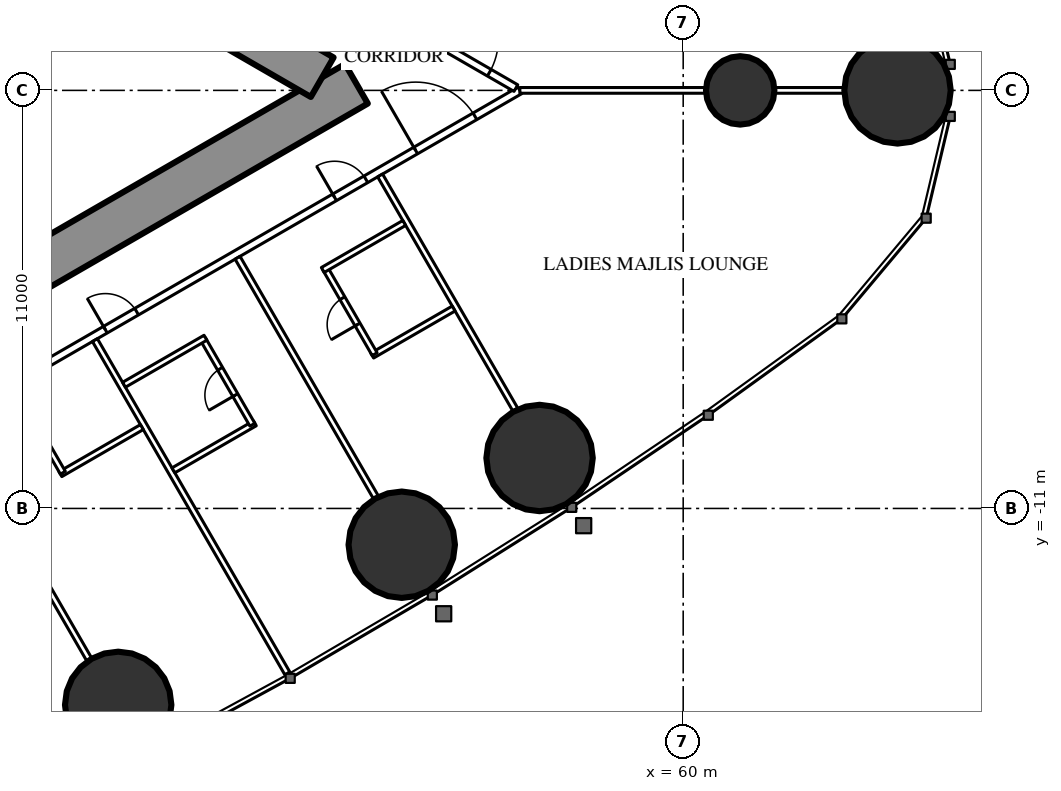
"""IFC4 building model, lengths in metres.
Left out: names, types, materials, properties, quantities, classifications, styles, units other than length and angle.
Written with IfcOpenShell. Run it as: python <this file> out.ifc"""

import sys

from ifc_helpers import new_model, si_unit, direction, frame, frame_2d, origin, origin_2d, place, context, subcontext, project, spatial, rectangle, circle, extrude, element, fill, save


model = new_model("IFC4")
c1 = context("Model", 3, precision=1e-05, world=origin(), true_north=direction((0.0, 1.0)))
c2 = subcontext(c1, "Body", "Model", "MODEL_VIEW")
j1 = project(units=[si_unit("LENGTHUNIT", "METRE"), si_unit("PLANEANGLEUNIT", "RADIAN")], contexts=[c1])
p1 = place(None, origin())
s1 = spatial("IfcSite", under=j1, at=p1, CompositionType="ELEMENT")
p2 = place(p1, origin())
s2 = spatial("IfcBuilding", under=s1, at=p2, CompositionType="ELEMENT")
p3 = place(p2, frame((0.0, 0.0, 194.8)))
s3 = spatial("IfcBuildingStorey", under=s2, at=p3, CompositionType="ELEMENT", Elevation=194.8)
for number, where, z_axis, x_axis in (
    (1, (65.64, 0.0, 0.0), (0.0, 0.0, 1.0), (1.0, 0.0, 0.0)),
    (2, (45.134, -16.168, 0.0), (0.0, 0.0, 1.0), (1.0, 0.0, 0.0)),
    (3, (52.594, -11.955, 0.0), (0.0, 0.0, 1.0), (1.0, 0.0, 0.0)),
    (4, (56.221, -9.672, 0.0), (0.0, 0.0, 1.0), (1.0, 0.0, 0.0)),
):
    element("IfcColumn", number, at=place(p3, frame(where, z_axis=z_axis, x_axis=x_axis)), inside=s3, PredefinedType="COLUMN", context=c2, shape_type="SweptSolid", body=[
        extrude(circle(Radius=1.4, at=origin_2d()), origin(), (0.0, 0.0, 1.0), 3.5),
    ])
p4 = place(p3, frame((61.5, 0.0, 0.0), z_axis=(0.0, 0.0, 1.0), x_axis=(1.0, 0.0, 0.0)))
e5 = element("IfcColumn", 5, at=p4, inside=s3, PredefinedType="COLUMN", context=c2, shape_type="SweptSolid", body=[
    extrude(circle(Radius=0.9, at=origin_2d()), origin(), (0.0, 0.0, 1.0), 3.5),
])
p5 = place(p3, frame((27.2, -13.8, 0.0), z_axis=(0.0, 0.0, 1.0), x_axis=(0.866027159892, 0.499996958321, 0.0)))
e6 = element("IfcWall", 6, at=p5, inside=s3, PredefinedType="SHEAR", context=c2, shape_type="SweptSolid", body=[
    extrude(rectangle(XDim=27.947, YDim=1.2, at=frame_2d((13.973, 0.0))), origin(), (0.0, 0.0, 1.0), 3.5),
])
p6 = place(p5, frame((4.6, 0.0, 0.0)))
e7 = element("IfcOpeningElement", 7, at=p6, cuts=e6, PredefinedType="OPENING", context=c2, shape_type="SweptSolid", body=[
    extrude(rectangle(XDim=1.0, YDim=2.2, at=frame_2d((0.5, 1.1))), frame((0.0, 0.61, 0.0), z_axis=(0.0, -1.0, 0.0), x_axis=(1.0, 0.0, 0.0)), (0.0, 0.0, 1.0), 1.22),
])
p7 = place(p5, frame((13.395, 0.0, 0.0)))
e8 = element("IfcOpeningElement", 8, at=p7, cuts=e6, PredefinedType="OPENING", context=c2, shape_type="SweptSolid", body=[
    extrude(rectangle(XDim=1.8, YDim=2.2, at=frame_2d((0.9, 1.1))), frame((0.0, 0.61, 0.0), z_axis=(0.0, -1.0, 0.0), x_axis=(1.0, 0.0, 0.0)), (0.0, 0.0, 1.0), 1.22),
])
p8 = place(p3, frame((27.2, 13.8, 0.0), z_axis=(0.0, 0.0, 1.0), x_axis=(0.866024515034, -0.500001539357, 0.0)))
e9 = element("IfcWall", 9, at=p8, inside=s3, PredefinedType="SHEAR", context=c2, shape_type="SweptSolid", body=[
    extrude(rectangle(XDim=26.907, YDim=1.2, at=frame_2d((13.454, 0.0))), origin(), (0.0, 0.0, 1.0), 3.5),
])
p9 = place(p8, frame((4.6, 0.0, 0.0)))
e10 = element("IfcOpeningElement", 10, at=p9, cuts=e9, PredefinedType="OPENING", context=c2, shape_type="SweptSolid", body=[
    extrude(rectangle(XDim=1.0, YDim=2.2, at=frame_2d((0.5, 1.1))), frame((0.0, 0.61, 0.0), z_axis=(0.0, -1.0, 0.0), x_axis=(1.0, 0.0, 0.0)), (0.0, 0.0, 1.0), 1.22),
])
p10 = place(p8, frame((13.395, 0.0, 0.0)))
e11 = element("IfcOpeningElement", 11, at=p10, cuts=e9, PredefinedType="OPENING", context=c2, shape_type="SweptSolid", body=[
    extrude(rectangle(XDim=1.8, YDim=2.2, at=frame_2d((0.9, 1.1))), frame((0.0, 0.61, 0.0), z_axis=(0.0, -1.0, 0.0), x_axis=(1.0, 0.0, 0.0)), (0.0, 0.0, 1.0), 1.22),
])
p11 = place(p3, frame((27.959, -16.017, 0.0), z_axis=(0.0, 0.0, 1.0), x_axis=(0.866024151371, 0.500002169237, 0.0)))
e12 = element("IfcWall", 12, at=p11, inside=s3, PredefinedType="PARTITIONING", context=c2, shape_type="SweptSolid", body=[
    extrude(rectangle(XDim=32.034, YDim=0.2, at=frame_2d((16.017, 0.0))), origin(), (0.0, 0.0, 1.0), 3.25),
])
p12 = place(p11, frame((0.6, 0.0, 0.0)))
e13 = element("IfcOpeningElement", 13, at=p12, cuts=e12, PredefinedType="OPENING", context=c2, shape_type="SweptSolid", body=[
    extrude(rectangle(XDim=0.95, YDim=2.2, at=frame_2d((0.475, 1.1))), frame((0.0, 0.11, 0.0), z_axis=(0.0, -1.0, 0.0), x_axis=(1.0, 0.0, 0.0)), (0.0, 0.0, 1.0), 0.22),
])
p13 = place(p11, frame((13.132, 0.0, 0.0)))
e14 = element("IfcOpeningElement", 14, at=p13, cuts=e12, PredefinedType="OPENING", context=c2, shape_type="SweptSolid", body=[
    extrude(rectangle(XDim=0.95, YDim=2.2, at=frame_2d((0.475, 1.1))), frame((0.0, 0.11, 0.0), z_axis=(0.0, -1.0, 0.0), x_axis=(1.0, 0.0, 0.0)), (0.0, 0.0, 1.0), 0.22),
])
p14 = place(p11, frame((15.391, 0.0, 0.0)))
e15 = element("IfcOpeningElement", 15, at=p14, cuts=e12, PredefinedType="OPENING", context=c2, shape_type="SweptSolid", body=[
    extrude(rectangle(XDim=0.95, YDim=2.2, at=frame_2d((0.475, 1.1))), frame((0.0, 0.11, 0.0), z_axis=(0.0, -1.0, 0.0), x_axis=(1.0, 0.0, 0.0)), (0.0, 0.0, 1.0), 0.22),
])
p15 = place(p11, frame((19.441, 0.0, 0.0)))
e16 = element("IfcOpeningElement", 16, at=p15, cuts=e12, PredefinedType="OPENING", context=c2, shape_type="SweptSolid", body=[
    extrude(rectangle(XDim=0.95, YDim=2.2, at=frame_2d((0.475, 1.1))), frame((0.0, 0.11, 0.0), z_axis=(0.0, -1.0, 0.0), x_axis=(1.0, 0.0, 0.0)), (0.0, 0.0, 1.0), 0.22),
])
p16 = place(p11, frame((26.406, 0.0, 0.0)))
e17 = element("IfcOpeningElement", 17, at=p16, cuts=e12, PredefinedType="OPENING", context=c2, shape_type="SweptSolid", body=[
    extrude(rectangle(XDim=0.95, YDim=2.2, at=frame_2d((0.475, 1.1))), frame((0.0, 0.11, 0.0), z_axis=(0.0, -1.0, 0.0), x_axis=(1.0, 0.0, 0.0)), (0.0, 0.0, 1.0), 0.22),
])
p17 = place(p11, frame((28.87, 0.0, 0.0)))
e18 = element("IfcOpeningElement", 18, at=p17, cuts=e12, PredefinedType="OPENING", context=c2, shape_type="SweptSolid", body=[
    extrude(rectangle(XDim=1.8, YDim=2.2, at=frame_2d((0.9, 1.1))), frame((0.0, 0.11, 0.0), z_axis=(0.0, -1.0, 0.0), x_axis=(1.0, 0.0, 0.0)), (0.0, 0.0, 1.0), 0.22),
])
p18 = place(p3, frame((40.769, -8.737, 0.0), z_axis=(0.0, 0.0, 1.0), x_axis=(0.500013115284, -0.866017831539, 0.0)))
e19 = element("IfcWall", 19, at=p18, inside=s3, PredefinedType="PARTITIONING", context=c2, shape_type="SweptSolid", body=[
    extrude(rectangle(XDim=7.198, YDim=0.15, at=frame_2d((3.599, 0.0))), origin(), (0.0, 0.0, 1.0), 2.3),
])
p19 = place(p3, frame((44.521, -6.571, 0.0), z_axis=(0.0, 0.0, 1.0), x_axis=(0.500010457486, -0.866019366068, 0.0)))
e20 = element("IfcWall", 20, at=p19, inside=s3, PredefinedType="PARTITIONING", context=c2, shape_type="SweptSolid", body=[
    extrude(rectangle(XDim=10.126, YDim=0.15, at=frame_2d((5.063, 0.0))), origin(), (0.0, 0.0, 1.0), 3.25),
])
p20 = place(p3, frame((48.275, -4.404, 0.0), z_axis=(0.0, 0.0, 1.0), x_axis=(0.500006004368, -0.866021937133, 0.0)))
e21 = element("IfcWall", 21, at=p20, inside=s3, PredefinedType="PARTITIONING", context=c2, shape_type="SweptSolid", body=[
    extrude(rectangle(XDim=7.279, YDim=0.15, at=frame_2d((3.64, 0.0))), origin(), (0.0, 0.0, 1.0), 2.3),
])
p21 = place(p3, frame((52.025, -2.238, 0.0), z_axis=(0.0, 0.0, 1.0), x_axis=(0.499983785035, -0.866034765296, 0.0)))
e22 = element("IfcWall", 22, at=p21, inside=s3, PredefinedType="PARTITIONING", context=c2, shape_type="SweptSolid", body=[
    extrude(rectangle(XDim=7.116, YDim=0.15, at=frame_2d((3.558, 0.0))), origin(), (0.0, 0.0, 1.0), 2.3),
])
p22 = place(p3, frame((55.702, 0.0, 0.0), z_axis=(0.0, 0.0, 1.0), x_axis=(1.0, 0.0, 0.0)))
e23 = element("IfcWall", 23, at=p22, inside=s3, PredefinedType="PARTITIONING", context=c2, shape_type="SweptSolid", body=[
    extrude(rectangle(XDim=8.518, YDim=0.15, at=frame_2d((4.259, 0.0))), origin(), (0.0, 0.0, 1.0), 2.3),
])
p23 = place(p3, frame((52.639, 1.769, 0.0), z_axis=(0.0, 0.0, 1.0), x_axis=(0.866027340901, -0.4999966448, 0.0)))
e24 = element("IfcWall", 24, at=p23, inside=s3, PredefinedType="PARTITIONING", context=c2, shape_type="SweptSolid", body=[
    extrude(rectangle(XDim=3.417, YDim=0.2, at=frame_2d((1.708, 0.0))), origin(), (0.0, 0.0, 1.0), 3.25),
])
p24 = place(p23, frame((0.809, 0.0, 0.0)))
e25 = element("IfcOpeningElement", 25, at=p24, cuts=e24, PredefinedType="OPENING", context=c2, shape_type="SweptSolid", body=[
    extrude(rectangle(XDim=1.8, YDim=2.2, at=frame_2d((0.9, 1.1))), frame((0.0, 0.11, 0.0), z_axis=(0.0, -1.0, 0.0), x_axis=(1.0, 0.0, 0.0)), (0.0, 0.0, 1.0), 0.22),
])
p25 = place(p3, frame((43.613, -10.097, 0.0), z_axis=(0.0, 0.0, 1.0), x_axis=(0.866031185235, 0.4999899861, 0.0)))
e26 = element("IfcWall", 26, at=p25, inside=s3, PredefinedType="PARTITIONING", context=c2, shape_type="SweptSolid", body=[
    extrude(rectangle(XDim=2.475, YDim=0.15, at=frame_2d((1.238, 0.0))), origin(), (0.0, 0.0, 1.0), 3.25),
])
p26 = place(p3, frame((42.378, -7.808, 0.0), z_axis=(0.0, 0.0, 1.0), x_axis=(0.500006934395, -0.866021400173, 0.0)))
e27 = element("IfcWall", 27, at=p26, inside=s3, PredefinedType="PARTITIONING", context=c2, shape_type="SweptSolid", body=[
    extrude(rectangle(XDim=2.6, YDim=0.15, at=frame_2d((1.3, 0.0))), origin(), (0.0, 0.0, 1.0), 3.25),
])
p27 = place(p26, frame((0.9, 0.0, 0.0)))
e28 = element("IfcOpeningElement", 28, at=p27, cuts=e27, PredefinedType="OPENING", context=c2, shape_type="SweptSolid", body=[
    extrude(rectangle(XDim=0.8, YDim=2.2, at=frame_2d((0.4, 1.1))), frame((0.0, 0.085, 0.0), z_axis=(0.0, -1.0, 0.0), x_axis=(1.0, 0.0, 0.0)), (0.0, 0.0, 1.0), 0.17),
])
p28 = place(p3, frame((46.586, -9.997, 0.0), z_axis=(0.0, 0.0, 1.0), x_axis=(0.866006523861, 0.500032699561, 0.0)))
e29 = element("IfcWall", 29, at=p28, inside=s3, PredefinedType="PARTITIONING", context=c2, shape_type="SweptSolid", body=[
    extrude(rectangle(XDim=2.475, YDim=0.15, at=frame_2d((1.237, 0.0))), origin(), (0.0, 0.0, 1.0), 3.25),
])
p29 = place(p3, frame((47.365, -6.546, 0.0), z_axis=(0.0, 0.0, 1.0), x_axis=(0.500006934395, -0.866021400173, 0.0)))
e30 = element("IfcWall", 30, at=p29, inside=s3, PredefinedType="PARTITIONING", context=c2, shape_type="SweptSolid", body=[
    extrude(rectangle(XDim=2.6, YDim=0.15, at=frame_2d((1.3, 0.0))), origin(), (0.0, 0.0, 1.0), 3.25),
])
p30 = place(p29, frame((0.9, 0.0, 0.0)))
e31 = element("IfcOpeningElement", 31, at=p30, cuts=e30, PredefinedType="OPENING", context=c2, shape_type="SweptSolid", body=[
    extrude(rectangle(XDim=0.8, YDim=2.2, at=frame_2d((0.4, 1.1))), frame((0.0, 0.085, 0.0), z_axis=(0.0, -1.0, 0.0), x_axis=(1.0, 0.0, 0.0)), (0.0, 0.0, 1.0), 0.17),
])
for number, where, z_axis, x_axis in (
    (32, (45.286, -7.746, 0.0), (0.0, 0.0, 1.0), (0.866, 0.5, 0.0)),
    (33, (51.817, -6.978, 0.0), (0.0, 0.0, 1.0), (0.866, 0.5, 0.0)),
):
    element("IfcWall", number, at=place(p3, frame(where, z_axis=z_axis, x_axis=x_axis)), inside=s3, PredefinedType="PARTITIONING", context=c2, shape_type="SweptSolid", body=[
        extrude(rectangle(XDim=2.475, YDim=0.15, at=frame_2d((1.237, 0.0))), origin(), (0.0, 0.0, 1.0), 3.25),
    ])
p31 = place(p3, frame((50.582, -4.688, 0.0), z_axis=(0.0, 0.0, 1.0), x_axis=(0.500006934395, -0.866021400173, 0.0)))
e34 = element("IfcWall", 34, at=p31, inside=s3, PredefinedType="PARTITIONING", context=c2, shape_type="SweptSolid", body=[
    extrude(rectangle(XDim=2.6, YDim=0.15, at=frame_2d((1.3, 0.0))), origin(), (0.0, 0.0, 1.0), 3.25),
])
p32 = place(p31, frame((0.9, 0.0, 0.0)))
e35 = element("IfcOpeningElement", 35, at=p32, cuts=e34, PredefinedType="OPENING", context=c2, shape_type="SweptSolid", body=[
    extrude(rectangle(XDim=0.8, YDim=2.2, at=frame_2d((0.4, 1.1))), frame((0.0, 0.085, 0.0), z_axis=(0.0, -1.0, 0.0), x_axis=(1.0, 0.0, 0.0)), (0.0, 0.0, 1.0), 0.17),
])
p33 = place(p3, frame((50.517, -4.726, 0.0), z_axis=(0.0, 0.0, 1.0), x_axis=(0.866031185235, 0.4999899861, 0.0)))
e36 = element("IfcWall", 36, at=p33, inside=s3, PredefinedType="PARTITIONING", context=c2, shape_type="SweptSolid", body=[
    extrude(rectangle(XDim=2.475, YDim=0.15, at=frame_2d((1.238, 0.0))), origin(), (0.0, 0.0, 1.0), 3.25),
])
p34 = place(p30, origin())
e37 = element("IfcDoor", 37, at=p34, inside=s3, OperationType="SINGLE_SWING_RIGHT", PredefinedType="DOOR", context=c2, shape_type="SweptSolid", body=[
    extrude(rectangle(XDim=0.8, YDim=2.2, at=frame_2d((0.4, 1.1))), frame((0.0, 0.025, 0.0), z_axis=(0.0, -1.0, 0.0), x_axis=(1.0, 0.0, 0.0)), (0.0, 0.0, 1.0), 0.05),
])
fill(e31, e37)
p35 = place(p15, origin())
e38 = element("IfcDoor", 38, at=p35, inside=s3, OperationType="SINGLE_SWING_LEFT", PredefinedType="DOOR", context=c2, shape_type="SweptSolid", body=[
    extrude(rectangle(XDim=0.95, YDim=2.2, at=frame_2d((0.475, 1.1))), frame((0.0, 0.025, 0.0), z_axis=(0.0, -1.0, 0.0), x_axis=(1.0, 0.0, 0.0)), (0.0, 0.0, 1.0), 0.05),
])
fill(e16, e38)
p36 = place(p32, origin())
e39 = element("IfcDoor", 39, at=p36, inside=s3, OperationType="SINGLE_SWING_RIGHT", PredefinedType="DOOR", context=c2, shape_type="SweptSolid", body=[
    extrude(rectangle(XDim=0.8, YDim=2.2, at=frame_2d((0.4, 1.1))), frame((0.0, 0.025, 0.0), z_axis=(0.0, -1.0, 0.0), x_axis=(1.0, 0.0, 0.0)), (0.0, 0.0, 1.0), 0.05),
])
fill(e35, e39)
p37 = place(p16, origin())
e40 = element("IfcDoor", 40, at=p37, inside=s3, OperationType="SINGLE_SWING_LEFT", PredefinedType="DOOR", context=c2, shape_type="SweptSolid", body=[
    extrude(rectangle(XDim=0.95, YDim=2.2, at=frame_2d((0.475, 1.1))), frame((0.0, 0.025, 0.0), z_axis=(0.0, -1.0, 0.0), x_axis=(1.0, 0.0, 0.0)), (0.0, 0.0, 1.0), 0.05),
])
fill(e17, e40)
p38 = place(p17, origin())
e41 = element("IfcDoor", 41, at=p38, inside=s3, OperationType="DOUBLE_DOOR_SINGLE_SWING", PredefinedType="DOOR", context=c2, shape_type="SweptSolid", body=[
    extrude(rectangle(XDim=1.8, YDim=2.2, at=frame_2d((0.9, 1.1))), frame((0.0, 0.025, 0.0), z_axis=(0.0, -1.0, 0.0), x_axis=(1.0, 0.0, 0.0)), (0.0, 0.0, 1.0), 0.05),
])
fill(e18, e41)
p39 = place(p24, origin())
e42 = element("IfcDoor", 42, at=p39, inside=s3, OperationType="DOUBLE_DOOR_SINGLE_SWING", PredefinedType="DOOR", context=c2, shape_type="SweptSolid", body=[
    extrude(rectangle(XDim=1.8, YDim=2.2, at=frame_2d((0.9, 1.1))), frame((0.0, 0.025, 0.0), z_axis=(0.0, -1.0, 0.0), x_axis=(1.0, 0.0, 0.0)), (0.0, 0.0, 1.0), 0.05),
])
fill(e25, e42)
save(model, sys.argv[1])
